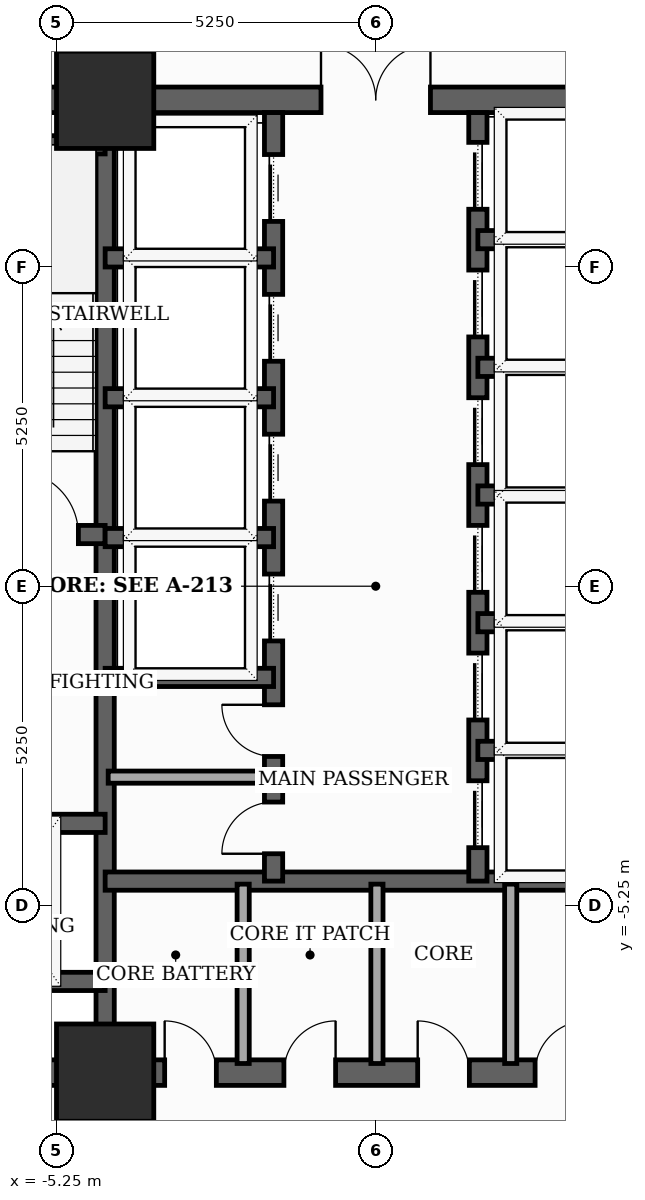
"""IFC4 building model, lengths in metres.
Left out: names, types, materials, properties, quantities, classifications, styles, units other than length and angle.
Written with IfcOpenShell. Run it as: python <this file> out.ifc"""

import sys

from ifc_helpers import new_model, si_unit, direction, frame, frame_2d, origin, origin_2d, place, context, subcontext, project, spatial, rectangle, extrude, element, fill, save


model = new_model("IFC4")
c1 = context("Model", 3, precision=1e-05, world=origin(), true_north=direction((0.0, 1.0)))
c2 = subcontext(c1, "Body", "Model", "MODEL_VIEW")
j1 = project(units=[si_unit("LENGTHUNIT", "METRE"), si_unit("PLANEANGLEUNIT", "RADIAN")], contexts=[c1])
p1 = place(None, origin())
s1 = spatial("IfcSite", under=j1, at=p1, CompositionType="ELEMENT")
p2 = place(p1, origin())
s2 = spatial("IfcBuilding", under=s1, at=p2, CompositionType="ELEMENT")
p3 = place(p2, frame((0.0, 0.0, 51.9)))
s3 = spatial("IfcBuildingStorey", under=s2, at=p3, CompositionType="ELEMENT", Elevation=51.9)
for number, where, z_axis, x_axis in (
    (1, (-4.45, -8.0, 0.0), (0.0, 0.0, 1.0), (1.0, 0.0, 0.0)),
    (2, (-4.45, 8.0, 0.0), (0.0, 0.0, 1.0), (1.0, 0.0, 0.0)),
):
    element("IfcColumn", number, at=place(p3, frame(where, z_axis=z_axis, x_axis=x_axis)), inside=s3, PredefinedType="COLUMN", context=c2, shape_type="SweptSolid", body=[
        extrude(rectangle(XDim=1.6, YDim=1.6, at=origin_2d()), origin(), (0.0, 0.0, 1.0), 3.7),
    ])
p4 = place(p3, frame((-8.0, -8.0, 0.0), z_axis=(0.0, 0.0, 1.0), x_axis=(1.0, 0.0, 0.0)))
e3 = element("IfcWall", 3, at=p4, inside=s3, PredefinedType="SHEAR", context=c2, shape_type="SweptSolid", body=[
    extrude(rectangle(XDim=16.0, YDim=0.42, at=frame_2d((8.0, 0.0))), origin(), (0.0, 0.0, 1.0), 3.5),
])
p5 = place(p4, frame((4.529, 0.0, 0.0)))
e4 = element("IfcOpeningElement", 4, at=p5, cuts=e3, PredefinedType="OPENING", context=c2, shape_type="SweptSolid", body=[
    extrude(rectangle(XDim=0.85, YDim=2.02, at=frame_2d((0.425, 1.01))), frame((0.0, 0.22, 0.0), z_axis=(0.0, -1.0, 0.0), x_axis=(1.0, 0.0, 0.0)), (0.0, 0.0, 1.0), 0.44),
])
p6 = place(p4, frame((6.49, 0.0, 0.0)))
e5 = element("IfcOpeningElement", 5, at=p6, cuts=e3, PredefinedType="OPENING", context=c2, shape_type="SweptSolid", body=[
    extrude(rectangle(XDim=0.85, YDim=2.02, at=frame_2d((0.425, 1.01))), frame((0.0, 0.22, 0.0), z_axis=(0.0, -1.0, 0.0), x_axis=(1.0, 0.0, 0.0)), (0.0, 0.0, 1.0), 0.44),
])
p7 = place(p4, frame((8.69, 0.0, 0.0)))
e6 = element("IfcOpeningElement", 6, at=p7, cuts=e3, PredefinedType="OPENING", context=c2, shape_type="SweptSolid", body=[
    extrude(rectangle(XDim=0.85, YDim=2.02, at=frame_2d((0.425, 1.01))), frame((0.0, 0.22, 0.0), z_axis=(0.0, -1.0, 0.0), x_axis=(1.0, 0.0, 0.0)), (0.0, 0.0, 1.0), 0.44),
])
p8 = place(p4, frame((10.621, 0.0, 0.0)))
e7 = element("IfcOpeningElement", 7, at=p8, cuts=e3, PredefinedType="OPENING", context=c2, shape_type="SweptSolid", body=[
    extrude(rectangle(XDim=0.85, YDim=2.02, at=frame_2d((0.425, 1.01))), frame((0.0, 0.22, 0.0), z_axis=(0.0, -1.0, 0.0), x_axis=(1.0, 0.0, 0.0)), (0.0, 0.0, 1.0), 0.44),
])
p9 = place(p3, frame((-8.0, 8.0, 0.0), z_axis=(0.0, 0.0, 1.0), x_axis=(1.0, 0.0, 0.0)))
e8 = element("IfcWall", 8, at=p9, inside=s3, PredefinedType="SHEAR", context=c2, shape_type="SweptSolid", body=[
    extrude(rectangle(XDim=16.0, YDim=0.42, at=frame_2d((8.0, 0.0))), origin(), (0.0, 0.0, 1.0), 3.5),
])
p10 = place(p9, frame((7.1, 0.0, 0.0)))
e9 = element("IfcOpeningElement", 9, at=p10, cuts=e8, PredefinedType="OPENING", context=c2, shape_type="SweptSolid", body=[
    extrude(rectangle(XDim=1.8, YDim=2.15, at=frame_2d((0.9, 1.075))), frame((0.0, 0.22, 0.0), z_axis=(0.0, -1.0, 0.0), x_axis=(1.0, 0.0, 0.0)), (0.0, 0.0, 1.0), 0.44),
])
p11 = place(p3, frame((-4.45, -7.79, 0.0), z_axis=(0.0, 0.0, 1.0), x_axis=(0.0, 1.0, 0.0)))
e10 = element("IfcWall", 10, at=p11, inside=s3, PredefinedType="SHEAR", context=c2, shape_type="SweptSolid", body=[
    extrude(rectangle(XDim=15.58, YDim=0.3, at=frame_2d((7.79, 0.0))), origin(), (0.0, 0.0, 1.0), 3.5),
])
p12 = place(p3, frame((-7.79, 0.85, 0.0), z_axis=(0.0, 0.0, 1.0), x_axis=(1.0, 0.0, 0.0)))
e11 = element("IfcWall", 11, at=p12, inside=s3, PredefinedType="SHEAR", context=c2, shape_type="SweptSolid", body=[
    extrude(rectangle(XDim=3.34, YDim=0.3, at=frame_2d((1.67, 0.0))), origin(), (0.0, 0.0, 1.0), 3.5),
])
p13 = place(p12, frame((1.85, 0.0, 0.0)))
e12 = element("IfcOpeningElement", 12, at=p13, cuts=e11, PredefinedType="OPENING", context=c2, shape_type="SweptSolid", body=[
    extrude(rectangle(XDim=1.05, YDim=2.15, at=frame_2d((0.525, 1.075))), frame((0.0, 0.16, 0.0), z_axis=(0.0, -1.0, 0.0), x_axis=(1.0, 0.0, 0.0)), (0.0, 0.0, 1.0), 0.32),
])
p14 = place(p3, frame((-7.79, 7.26, 0.0), z_axis=(0.0, 0.0, 1.0), x_axis=(1.0, 0.0, 0.0)))
e13 = element("IfcWall", 13, at=p14, inside=s3, PredefinedType="SHEAR", context=c2, shape_type="SweptSolid", body=[
    extrude(rectangle(XDim=3.34, YDim=0.3, at=frame_2d((1.67, 0.0))), origin(), (0.0, 0.0, 1.0), 3.5),
])
p15 = place(p3, frame((-7.79, -3.9, 0.0), z_axis=(0.0, 0.0, 1.0), x_axis=(1.0, 0.0, 0.0)))
e14 = element("IfcWall", 14, at=p15, inside=s3, PredefinedType="SHEAR", context=c2, shape_type="SweptSolid", body=[
    extrude(rectangle(XDim=3.34, YDim=0.3, at=frame_2d((1.67, 0.0))), origin(), (0.0, 0.0, 1.0), 3.5),
])
p16 = place(p15, frame((1.27, 0.0, 0.0)))
e15 = element("IfcOpeningElement", 15, at=p16, cuts=e14, PredefinedType="OPENING", context=c2, shape_type="SweptSolid", body=[
    extrude(rectangle(XDim=1.1, YDim=2.1, at=frame_2d((0.55, 1.05))), frame((0.0, 0.16, 0.0), z_axis=(0.0, -1.0, 0.0), x_axis=(1.0, 0.0, 0.0)), (0.0, 0.0, 1.0), 0.32),
])
p17 = place(p3, frame((-7.79, -6.5, 0.0), z_axis=(0.0, 0.0, 1.0), x_axis=(1.0, 0.0, 0.0)))
e16 = element("IfcWall", 16, at=p17, inside=s3, PredefinedType="SHEAR", context=c2, shape_type="SweptSolid", body=[
    extrude(rectangle(XDim=3.34, YDim=0.3, at=frame_2d((1.67, 0.0))), origin(), (0.0, 0.0, 1.0), 3.5),
])
p18 = place(p3, frame((-4.45, -4.85, 0.0), z_axis=(0.0, 0.0, 1.0), x_axis=(1.0, 0.0, 0.0)))
e17 = element("IfcWall", 17, at=p18, inside=s3, PredefinedType="SHEAR", context=c2, shape_type="SweptSolid", body=[
    extrude(rectangle(XDim=8.9, YDim=0.3, at=frame_2d((4.45, 0.0))), origin(), (0.0, 0.0, 1.0), 3.5),
])
p19 = place(p3, frame((-1.68, -4.85, 0.0), z_axis=(0.0, 0.0, 1.0), x_axis=(0.0, 1.0, 0.0)))
e18 = element("IfcWall", 18, at=p19, inside=s3, PredefinedType="SHEAR", context=c2, shape_type="SweptSolid", body=[
    extrude(rectangle(XDim=12.64, YDim=0.3, at=frame_2d((6.32, 0.0))), origin(), (0.0, 0.0, 1.0), 3.5),
])
p20 = place(p19, frame((3.95, 0.0, 0.0)))
e19 = element("IfcOpeningElement", 19, at=p20, cuts=e18, PredefinedType="OPENING", context=c2, shape_type="SweptSolid", body=[
    extrude(rectangle(XDim=1.1, YDim=2.1, at=frame_2d((0.55, 1.05))), frame((0.0, 0.16, 0.0), z_axis=(0.0, -1.0, 0.0), x_axis=(1.0, 0.0, 0.0)), (0.0, 0.0, 1.0), 0.32),
])
p21 = place(p19, frame((6.25, 0.0, 0.0)))
e20 = element("IfcOpeningElement", 20, at=p21, cuts=e18, PredefinedType="OPENING", context=c2, shape_type="SweptSolid", body=[
    extrude(rectangle(XDim=1.1, YDim=2.1, at=frame_2d((0.55, 1.05))), frame((0.0, 0.16, 0.0), z_axis=(0.0, -1.0, 0.0), x_axis=(1.0, 0.0, 0.0)), (0.0, 0.0, 1.0), 0.32),
])
p22 = place(p19, frame((8.55, 0.0, 0.0)))
e21 = element("IfcOpeningElement", 21, at=p22, cuts=e18, PredefinedType="OPENING", context=c2, shape_type="SweptSolid", body=[
    extrude(rectangle(XDim=1.1, YDim=2.1, at=frame_2d((0.55, 1.05))), frame((0.0, 0.16, 0.0), z_axis=(0.0, -1.0, 0.0), x_axis=(1.0, 0.0, 0.0)), (0.0, 0.0, 1.0), 0.32),
])
p23 = place(p19, frame((10.85, 0.0, 0.0)))
e22 = element("IfcOpeningElement", 22, at=p23, cuts=e18, PredefinedType="OPENING", context=c2, shape_type="SweptSolid", body=[
    extrude(rectangle(XDim=1.1, YDim=2.1, at=frame_2d((0.55, 1.05))), frame((0.0, 0.16, 0.0), z_axis=(0.0, -1.0, 0.0), x_axis=(1.0, 0.0, 0.0)), (0.0, 0.0, 1.0), 0.32),
])
p24 = place(p19, frame((0.45, 0.0, 0.0)))
e23 = element("IfcOpeningElement", 23, at=p24, cuts=e18, PredefinedType="OPENING", context=c2, shape_type="SweptSolid", body=[
    extrude(rectangle(XDim=0.85, YDim=2.02, at=frame_2d((0.425, 1.01))), frame((0.0, 0.16, 0.0), z_axis=(0.0, -1.0, 0.0), x_axis=(1.0, 0.0, 0.0)), (0.0, 0.0, 1.0), 0.32),
])
p25 = place(p19, frame((2.05, 0.0, 0.0)))
e24 = element("IfcOpeningElement", 24, at=p25, cuts=e18, PredefinedType="OPENING", context=c2, shape_type="SweptSolid", body=[
    extrude(rectangle(XDim=0.85, YDim=2.02, at=frame_2d((0.425, 1.01))), frame((0.0, 0.16, 0.0), z_axis=(0.0, -1.0, 0.0), x_axis=(1.0, 0.0, 0.0)), (0.0, 0.0, 1.0), 0.32),
])
p26 = place(p3, frame((1.68, -4.85, 0.0), z_axis=(0.0, 0.0, 1.0), x_axis=(0.0, 1.0, 0.0)))
e25 = element("IfcWall", 25, at=p26, inside=s3, PredefinedType="SHEAR", context=c2, shape_type="SweptSolid", body=[
    extrude(rectangle(XDim=12.64, YDim=0.3, at=frame_2d((6.32, 0.0))), origin(), (0.0, 0.0, 1.0), 3.5),
])
p27 = place(p26, frame((0.55, 0.0, 0.0)))
e26 = element("IfcOpeningElement", 26, at=p27, cuts=e25, PredefinedType="OPENING", context=c2, shape_type="SweptSolid", body=[
    extrude(rectangle(XDim=1.1, YDim=2.1, at=frame_2d((0.55, 1.05))), frame((0.0, 0.16, 0.0), z_axis=(0.0, -1.0, 0.0), x_axis=(1.0, 0.0, 0.0)), (0.0, 0.0, 1.0), 0.32),
])
p28 = place(p26, frame((2.65, 0.0, 0.0)))
e27 = element("IfcOpeningElement", 27, at=p28, cuts=e25, PredefinedType="OPENING", context=c2, shape_type="SweptSolid", body=[
    extrude(rectangle(XDim=1.1, YDim=2.1, at=frame_2d((0.55, 1.05))), frame((0.0, 0.16, 0.0), z_axis=(0.0, -1.0, 0.0), x_axis=(1.0, 0.0, 0.0)), (0.0, 0.0, 1.0), 0.32),
])
p29 = place(p26, frame((4.75, 0.0, 0.0)))
e28 = element("IfcOpeningElement", 28, at=p29, cuts=e25, PredefinedType="OPENING", context=c2, shape_type="SweptSolid", body=[
    extrude(rectangle(XDim=1.1, YDim=2.1, at=frame_2d((0.55, 1.05))), frame((0.0, 0.16, 0.0), z_axis=(0.0, -1.0, 0.0), x_axis=(1.0, 0.0, 0.0)), (0.0, 0.0, 1.0), 0.32),
])
p30 = place(p26, frame((6.85, 0.0, 0.0)))
e29 = element("IfcOpeningElement", 29, at=p30, cuts=e25, PredefinedType="OPENING", context=c2, shape_type="SweptSolid", body=[
    extrude(rectangle(XDim=1.1, YDim=2.1, at=frame_2d((0.55, 1.05))), frame((0.0, 0.16, 0.0), z_axis=(0.0, -1.0, 0.0), x_axis=(1.0, 0.0, 0.0)), (0.0, 0.0, 1.0), 0.32),
])
p31 = place(p26, frame((8.95, 0.0, 0.0)))
e30 = element("IfcOpeningElement", 30, at=p31, cuts=e25, PredefinedType="OPENING", context=c2, shape_type="SweptSolid", body=[
    extrude(rectangle(XDim=1.1, YDim=2.1, at=frame_2d((0.55, 1.05))), frame((0.0, 0.16, 0.0), z_axis=(0.0, -1.0, 0.0), x_axis=(1.0, 0.0, 0.0)), (0.0, 0.0, 1.0), 0.32),
])
p32 = place(p26, frame((11.05, 0.0, 0.0)))
e31 = element("IfcOpeningElement", 31, at=p32, cuts=e25, PredefinedType="OPENING", context=c2, shape_type="SweptSolid", body=[
    extrude(rectangle(XDim=1.1, YDim=2.1, at=frame_2d((0.55, 1.05))), frame((0.0, 0.16, 0.0), z_axis=(0.0, -1.0, 0.0), x_axis=(1.0, 0.0, 0.0)), (0.0, 0.0, 1.0), 0.32),
])
for number, where, z_axis, x_axis in (
    (32, (-4.45, -1.5, 0.0), (0.0, 0.0, 1.0), (1.0, 0.0, 0.0)),
    (33, (-4.45, 0.8, 0.0), (0.0, 0.0, 1.0), (1.0, 0.0, 0.0)),
    (34, (-4.45, 3.1, 0.0), (0.0, 0.0, 1.0), (1.0, 0.0, 0.0)),
    (35, (-4.45, 5.4, 0.0), (0.0, 0.0, 1.0), (1.0, 0.0, 0.0)),
    (36, (1.68, 1.5, 0.0), (0.0, 0.0, 1.0), (1.0, 0.0, 0.0)),
    (37, (1.68, 3.6, 0.0), (0.0, 0.0, 1.0), (1.0, 0.0, 0.0)),
    (38, (1.68, 5.7, 0.0), (0.0, 0.0, 1.0), (1.0, 0.0, 0.0)),
    (39, (1.68, -2.7, 0.0), (0.0, 0.0, 1.0), (1.0, 0.0, 0.0)),
    (40, (1.68, -0.6, 0.0), (0.0, 0.0, 1.0), (1.0, 0.0, 0.0)),
):
    element("IfcWall", number, at=place(p3, frame(where, z_axis=z_axis, x_axis=x_axis)), inside=s3, PredefinedType="SHEAR", context=c2, shape_type="SweptSolid", body=[
        extrude(rectangle(XDim=2.77, YDim=0.3, at=frame_2d((1.385, 0.0))), origin(), (0.0, 0.0, 1.0), 3.5),
    ])
for number, where, z_axis, x_axis in (
    (41, (-2.18, -7.85, 0.0), (0.0, 0.0, 1.0), (0.0, 1.0, 0.0)),
    (42, (0.02, -7.85, 0.0), (0.0, 0.0, 1.0), (0.0, 1.0, 0.0)),
    (43, (2.22, -7.85, 0.0), (0.0, 0.0, 1.0), (0.0, 1.0, 0.0)),
):
    element("IfcWall", number, at=place(p3, frame(where, z_axis=z_axis, x_axis=x_axis)), inside=s3, PredefinedType="SOLIDWALL", context=c2, shape_type="SweptSolid", body=[
        extrude(rectangle(XDim=2.95, YDim=0.2, at=frame_2d((1.475, 0.0))), origin(), (0.0, 0.0, 1.0), 2.885),
    ])
p33 = place(p3, frame((-4.4, -3.14, 0.0), z_axis=(0.0, 0.0, 1.0), x_axis=(1.0, 0.0, 0.0)))
e44 = element("IfcWall", 44, at=p33, inside=s3, PredefinedType="SOLIDWALL", context=c2, shape_type="SweptSolid", body=[
    extrude(rectangle(XDim=2.68, YDim=0.2, at=frame_2d((1.34, 0.0))), origin(), (0.0, 0.0, 1.0), 3.5),
])
p34 = place(p5, origin())
e45 = element("IfcDoor", 45, at=p34, inside=s3, OperationType="SINGLE_SWING_LEFT", PredefinedType="TRAPDOOR", context=c2, shape_type="SweptSolid", body=[
    extrude(rectangle(XDim=0.85, YDim=2.02, at=frame_2d((0.425, 1.01))), frame((0.0, 0.025, 0.0), z_axis=(0.0, -1.0, 0.0), x_axis=(1.0, 0.0, 0.0)), (0.0, 0.0, 1.0), 0.05),
])
fill(e4, e45)
p35 = place(p6, origin())
e46 = element("IfcDoor", 46, at=p35, inside=s3, OperationType="SINGLE_SWING_RIGHT", PredefinedType="TRAPDOOR", context=c2, shape_type="SweptSolid", body=[
    extrude(rectangle(XDim=0.85, YDim=2.02, at=frame_2d((0.425, 1.01))), frame((0.0, 0.025, 0.0), z_axis=(0.0, -1.0, 0.0), x_axis=(1.0, 0.0, 0.0)), (0.0, 0.0, 1.0), 0.05),
])
fill(e5, e46)
p36 = place(p7, origin())
e47 = element("IfcDoor", 47, at=p36, inside=s3, OperationType="SINGLE_SWING_LEFT", PredefinedType="TRAPDOOR", context=c2, shape_type="SweptSolid", body=[
    extrude(rectangle(XDim=0.85, YDim=2.02, at=frame_2d((0.425, 1.01))), frame((0.0, 0.025, 0.0), z_axis=(0.0, -1.0, 0.0), x_axis=(1.0, 0.0, 0.0)), (0.0, 0.0, 1.0), 0.05),
])
fill(e6, e47)
p37 = place(p8, origin())
e48 = element("IfcDoor", 48, at=p37, inside=s3, OperationType="SINGLE_SWING_RIGHT", PredefinedType="TRAPDOOR", context=c2, shape_type="SweptSolid", body=[
    extrude(rectangle(XDim=0.85, YDim=2.02, at=frame_2d((0.425, 1.01))), frame((0.0, 0.025, 0.0), z_axis=(0.0, -1.0, 0.0), x_axis=(1.0, 0.0, 0.0)), (0.0, 0.0, 1.0), 0.05),
])
fill(e7, e48)
p38 = place(p10, origin())
e49 = element("IfcDoor", 49, at=p38, inside=s3, OperationType="DOUBLE_DOOR_SINGLE_SWING", PredefinedType="DOOR", context=c2, shape_type="SweptSolid", body=[
    extrude(rectangle(XDim=1.8, YDim=2.15, at=frame_2d((0.9, 1.075))), frame((0.0, 0.025, 0.0), z_axis=(0.0, -1.0, 0.0), x_axis=(1.0, 0.0, 0.0)), (0.0, 0.0, 1.0), 0.05),
])
fill(e9, e49)
p39 = place(p13, origin())
e50 = element("IfcDoor", 50, at=p39, inside=s3, OperationType="SINGLE_SWING_LEFT", PredefinedType="DOOR", context=c2, shape_type="SweptSolid", body=[
    extrude(rectangle(XDim=1.05, YDim=2.15, at=frame_2d((0.525, 1.075))), frame((0.0, 0.025, 0.0), z_axis=(0.0, -1.0, 0.0), x_axis=(1.0, 0.0, 0.0)), (0.0, 0.0, 1.0), 0.05),
])
fill(e12, e50)
p40 = place(p20, origin())
e51 = element("IfcDoor", 51, at=p40, inside=s3, OperationType="SLIDING_TO_LEFT", PredefinedType="DOOR", context=c2, shape_type="SweptSolid", body=[
    extrude(rectangle(XDim=1.1, YDim=2.1, at=frame_2d((0.55, 1.05))), frame((0.0, 0.025, 0.0), z_axis=(0.0, -1.0, 0.0), x_axis=(1.0, 0.0, 0.0)), (0.0, 0.0, 1.0), 0.05),
])
fill(e19, e51)
p41 = place(p21, origin())
e52 = element("IfcDoor", 52, at=p41, inside=s3, OperationType="SLIDING_TO_LEFT", PredefinedType="DOOR", context=c2, shape_type="SweptSolid", body=[
    extrude(rectangle(XDim=1.1, YDim=2.1, at=frame_2d((0.55, 1.05))), frame((0.0, 0.025, 0.0), z_axis=(0.0, -1.0, 0.0), x_axis=(1.0, 0.0, 0.0)), (0.0, 0.0, 1.0), 0.05),
])
fill(e20, e52)
p42 = place(p22, origin())
e53 = element("IfcDoor", 53, at=p42, inside=s3, OperationType="SLIDING_TO_LEFT", PredefinedType="DOOR", context=c2, shape_type="SweptSolid", body=[
    extrude(rectangle(XDim=1.1, YDim=2.1, at=frame_2d((0.55, 1.05))), frame((0.0, 0.025, 0.0), z_axis=(0.0, -1.0, 0.0), x_axis=(1.0, 0.0, 0.0)), (0.0, 0.0, 1.0), 0.05),
])
fill(e21, e53)
p43 = place(p23, origin())
e54 = element("IfcDoor", 54, at=p43, inside=s3, OperationType="SLIDING_TO_LEFT", PredefinedType="DOOR", context=c2, shape_type="SweptSolid", body=[
    extrude(rectangle(XDim=1.1, YDim=2.1, at=frame_2d((0.55, 1.05))), frame((0.0, 0.025, 0.0), z_axis=(0.0, -1.0, 0.0), x_axis=(1.0, 0.0, 0.0)), (0.0, 0.0, 1.0), 0.05),
])
fill(e22, e54)
p44 = place(p24, origin())
e55 = element("IfcDoor", 55, at=p44, inside=s3, OperationType="SINGLE_SWING_LEFT", PredefinedType="TRAPDOOR", context=c2, shape_type="SweptSolid", body=[
    extrude(rectangle(XDim=0.85, YDim=2.02, at=frame_2d((0.425, 1.01))), frame((0.0, 0.025, 0.0), z_axis=(0.0, -1.0, 0.0), x_axis=(1.0, 0.0, 0.0)), (0.0, 0.0, 1.0), 0.05),
])
fill(e23, e55)
p45 = place(p25, origin())
e56 = element("IfcDoor", 56, at=p45, inside=s3, OperationType="SINGLE_SWING_RIGHT", PredefinedType="TRAPDOOR", context=c2, shape_type="SweptSolid", body=[
    extrude(rectangle(XDim=0.85, YDim=2.02, at=frame_2d((0.425, 1.01))), frame((0.0, 0.025, 0.0), z_axis=(0.0, -1.0, 0.0), x_axis=(1.0, 0.0, 0.0)), (0.0, 0.0, 1.0), 0.05),
])
fill(e24, e56)
p46 = place(p27, origin())
e57 = element("IfcDoor", 57, at=p46, inside=s3, OperationType="SLIDING_TO_LEFT", PredefinedType="DOOR", context=c2, shape_type="SweptSolid", body=[
    extrude(rectangle(XDim=1.1, YDim=2.1, at=frame_2d((0.55, 1.05))), frame((0.0, 0.025, 0.0), z_axis=(0.0, -1.0, 0.0), x_axis=(1.0, 0.0, 0.0)), (0.0, 0.0, 1.0), 0.05),
])
fill(e26, e57)
p47 = place(p28, origin())
e58 = element("IfcDoor", 58, at=p47, inside=s3, OperationType="SLIDING_TO_LEFT", PredefinedType="DOOR", context=c2, shape_type="SweptSolid", body=[
    extrude(rectangle(XDim=1.1, YDim=2.1, at=frame_2d((0.55, 1.05))), frame((0.0, 0.025, 0.0), z_axis=(0.0, -1.0, 0.0), x_axis=(1.0, 0.0, 0.0)), (0.0, 0.0, 1.0), 0.05),
])
fill(e27, e58)
p48 = place(p29, origin())
e59 = element("IfcDoor", 59, at=p48, inside=s3, OperationType="SLIDING_TO_LEFT", PredefinedType="DOOR", context=c2, shape_type="SweptSolid", body=[
    extrude(rectangle(XDim=1.1, YDim=2.1, at=frame_2d((0.55, 1.05))), frame((0.0, 0.025, 0.0), z_axis=(0.0, -1.0, 0.0), x_axis=(1.0, 0.0, 0.0)), (0.0, 0.0, 1.0), 0.05),
])
fill(e28, e59)
p49 = place(p30, origin())
e60 = element("IfcDoor", 60, at=p49, inside=s3, OperationType="SLIDING_TO_LEFT", PredefinedType="DOOR", context=c2, shape_type="SweptSolid", body=[
    extrude(rectangle(XDim=1.1, YDim=2.1, at=frame_2d((0.55, 1.05))), frame((0.0, 0.025, 0.0), z_axis=(0.0, -1.0, 0.0), x_axis=(1.0, 0.0, 0.0)), (0.0, 0.0, 1.0), 0.05),
])
fill(e29, e60)
p50 = place(p31, origin())
e61 = element("IfcDoor", 61, at=p50, inside=s3, OperationType="SLIDING_TO_LEFT", PredefinedType="DOOR", context=c2, shape_type="SweptSolid", body=[
    extrude(rectangle(XDim=1.1, YDim=2.1, at=frame_2d((0.55, 1.05))), frame((0.0, 0.025, 0.0), z_axis=(0.0, -1.0, 0.0), x_axis=(1.0, 0.0, 0.0)), (0.0, 0.0, 1.0), 0.05),
])
fill(e30, e61)
p51 = place(p32, origin())
e62 = element("IfcDoor", 62, at=p51, inside=s3, OperationType="SLIDING_TO_LEFT", PredefinedType="DOOR", context=c2, shape_type="SweptSolid", body=[
    extrude(rectangle(XDim=1.1, YDim=2.1, at=frame_2d((0.55, 1.05))), frame((0.0, 0.025, 0.0), z_axis=(0.0, -1.0, 0.0), x_axis=(1.0, 0.0, 0.0)), (0.0, 0.0, 1.0), 0.05),
])
fill(e31, e62)
save(model, sys.argv[1])
